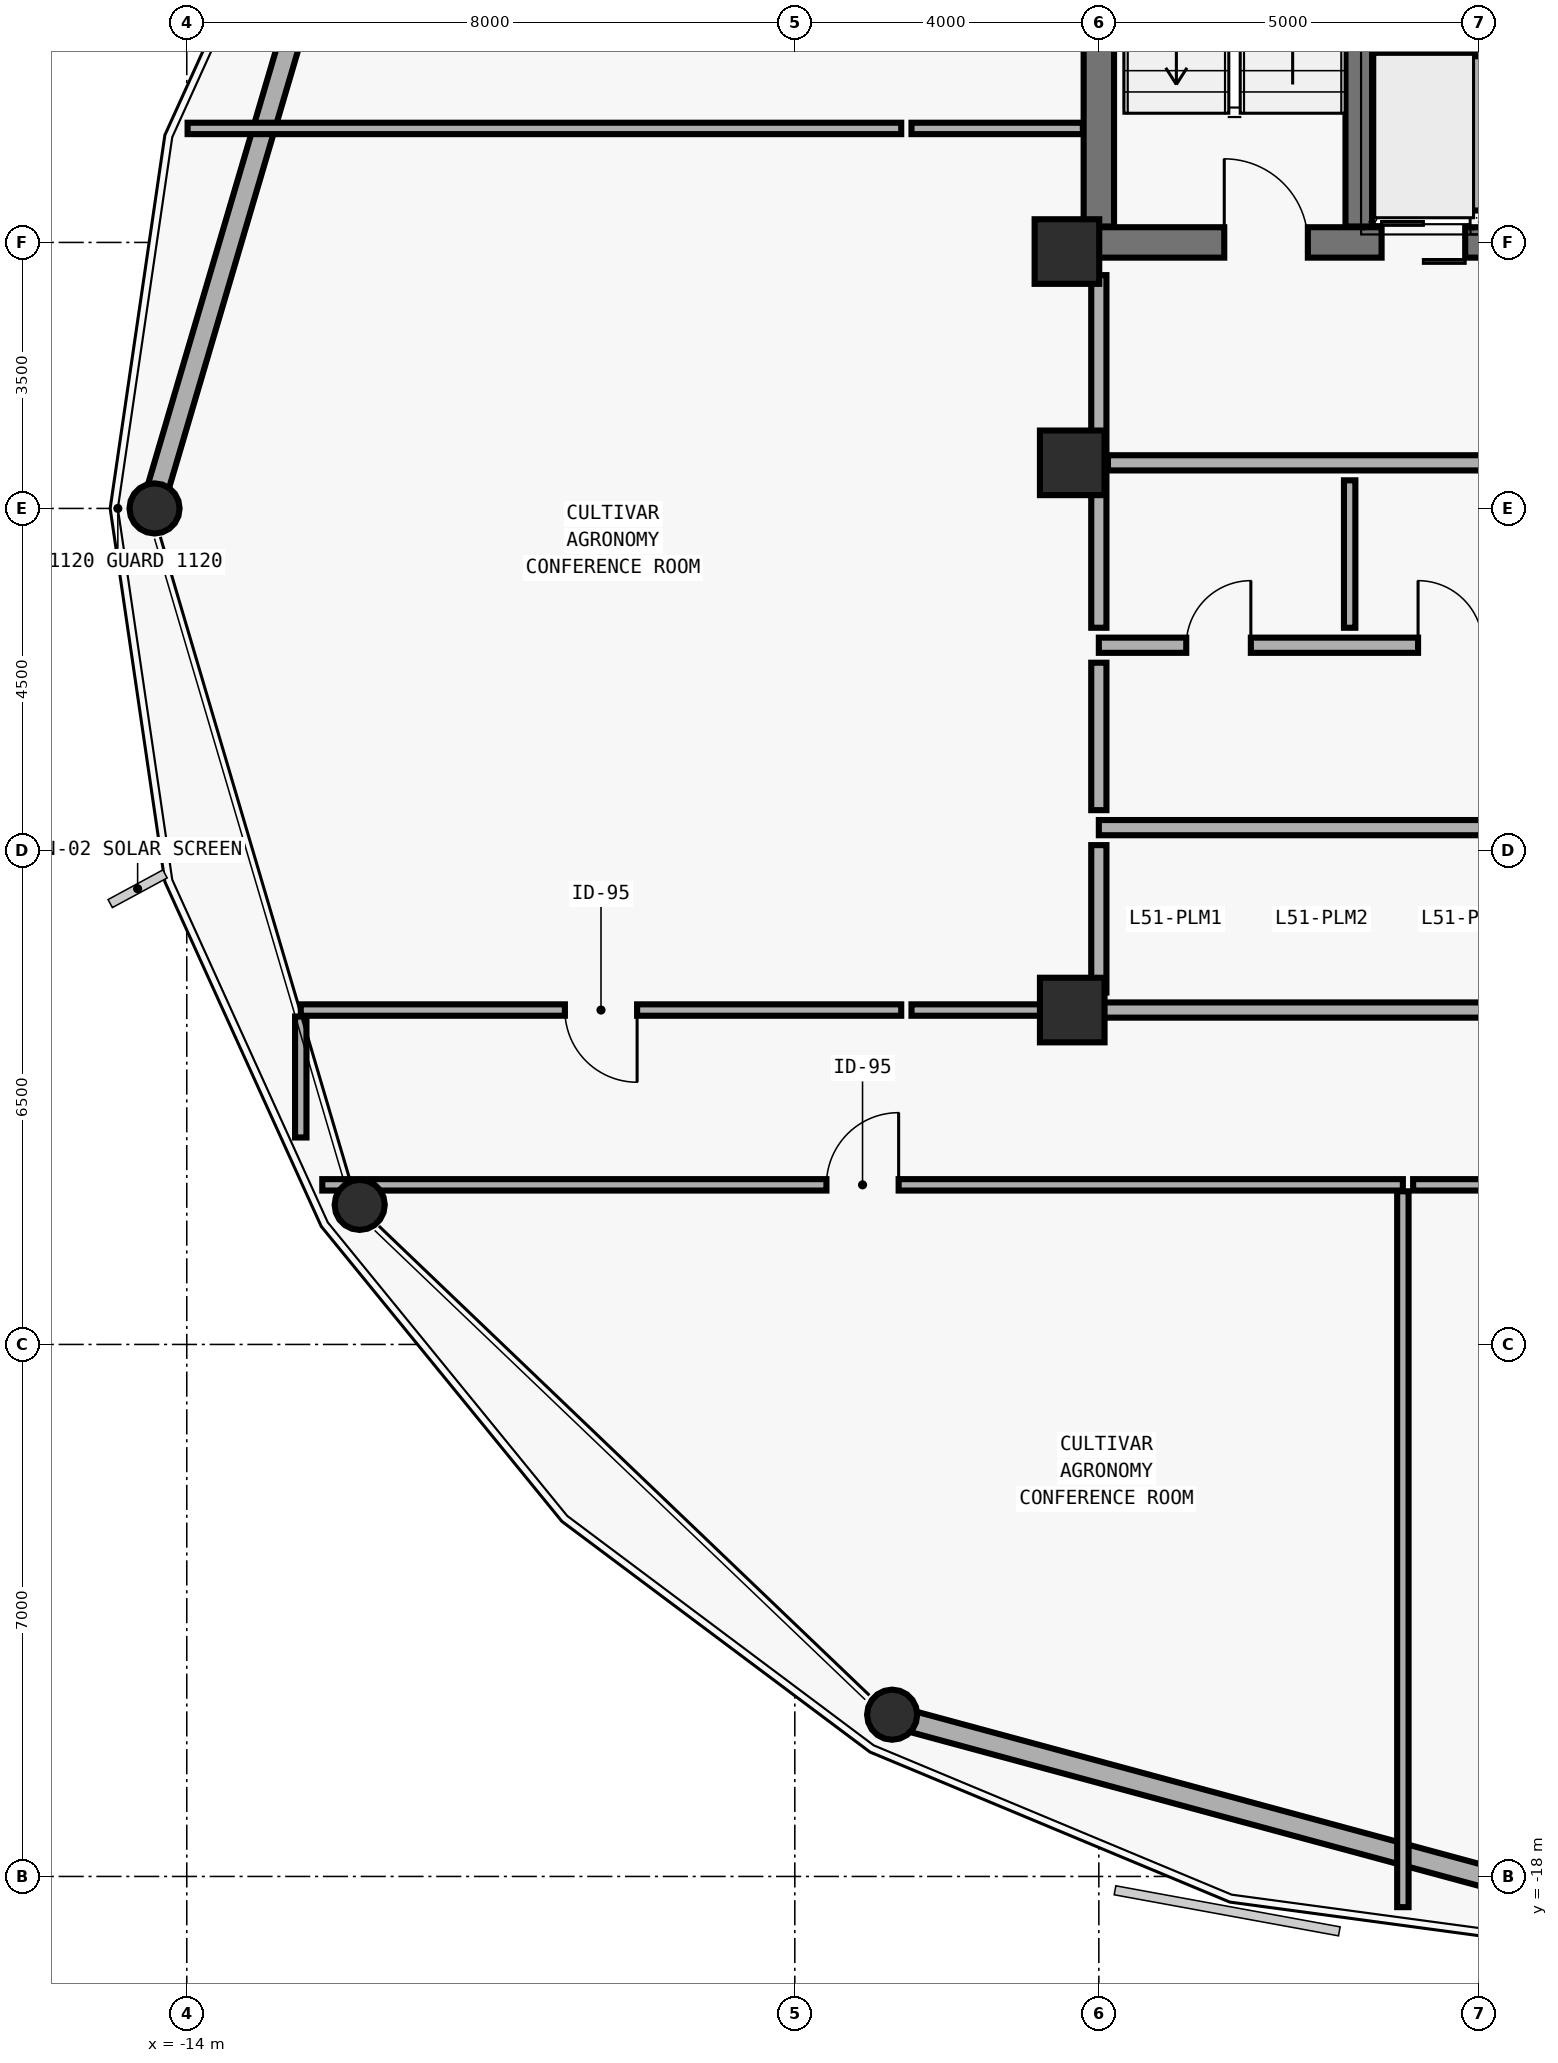
"""IFC4 building model, lengths in metres.
Left out: names, types, materials, properties, quantities, classifications, styles, units other than length and angle.
Written with IfcOpenShell. Run it as: python <this file> out.ifc"""

import sys

from ifc_helpers import new_model, si_unit, direction, frame, frame_2d, origin, origin_2d, place, context, subcontext, project, spatial, rectangle, hollow_circle, extrude, element, fill, save


model = new_model("IFC4")
c1 = context("Model", 3, precision=1e-05, world=origin(), true_north=direction((0.0, 1.0)))
c2 = subcontext(c1, "Body", "Model", "MODEL_VIEW")
j1 = project(units=[si_unit("LENGTHUNIT", "METRE"), si_unit("PLANEANGLEUNIT", "RADIAN")], contexts=[c1])
p1 = place(None, origin())
s1 = spatial("IfcSite", under=j1, at=p1, CompositionType="ELEMENT")
p2 = place(p1, origin())
s2 = spatial("IfcBuilding", under=s1, at=p2, CompositionType="ELEMENT")
p3 = place(p2, frame((0.0, 0.0, 204.0)))
s3 = spatial("IfcBuildingStorey", under=s2, at=p3, CompositionType="ELEMENT", Elevation=204.0)
p4 = place(p3, frame((-2.0, 3.5, 0.0), z_axis=(0.0, 0.0, 1.0), x_axis=(1.0, 0.0, 0.0)))
e1 = element("IfcWall", 1, at=p4, inside=s3, PredefinedType="SHEAR", context=c2, shape_type="SweptSolid", body=[
    extrude(rectangle(XDim=10.0, YDim=0.4, at=frame_2d((5.0, 0.0))), origin(), (0.0, 0.0, 1.0), 3.592),
])
p5 = place(p4, frame((1.65, 0.0, 0.0)))
e2 = element("IfcOpeningElement", 2, at=p5, cuts=e1, PredefinedType="OPENING", context=c2, shape_type="SweptSolid", body=[
    extrude(rectangle(XDim=1.1, YDim=2.15, at=frame_2d((0.55, 1.075))), frame((0.0, 0.21, 0.0), z_axis=(0.0, -1.0, 0.0), x_axis=(1.0, 0.0, 0.0)), (0.0, 0.0, 1.0), 0.42),
])
p6 = place(p4, frame((7.65, 0.0, 0.0)))
e3 = element("IfcOpeningElement", 3, at=p6, cuts=e1, PredefinedType="OPENING", context=c2, shape_type="SweptSolid", body=[
    extrude(rectangle(XDim=1.1, YDim=2.15, at=frame_2d((0.55, 1.075))), frame((0.0, 0.21, 0.0), z_axis=(0.0, -1.0, 0.0), x_axis=(1.0, 0.0, 0.0)), (0.0, 0.0, 1.0), 0.42),
])
p7 = place(p4, frame((3.72, 0.0, 0.0)))
e4 = element("IfcOpeningElement", 4, at=p7, cuts=e1, PredefinedType="OPENING", context=c2, shape_type="SweptSolid", body=[
    extrude(rectangle(XDim=1.1, YDim=2.2, at=frame_2d((0.55, 1.1))), frame((0.0, 0.21, 0.0), z_axis=(0.0, -1.0, 0.0), x_axis=(1.0, 0.0, 0.0)), (0.0, 0.0, 1.0), 0.42),
])
p8 = place(p4, frame((5.18, 0.0, 0.0)))
e5 = element("IfcOpeningElement", 5, at=p8, cuts=e1, PredefinedType="OPENING", context=c2, shape_type="SweptSolid", body=[
    extrude(rectangle(XDim=1.1, YDim=2.2, at=frame_2d((0.55, 1.1))), frame((0.0, 0.21, 0.0), z_axis=(0.0, -1.0, 0.0), x_axis=(1.0, 0.0, 0.0)), (0.0, 0.0, 1.0), 0.42),
])
p9 = place(p3, frame((-2.0, 3.71, 0.0), z_axis=(0.0, 0.0, 1.0), x_axis=(0.0, 1.0, 0.0)))
e6 = element("IfcWall", 6, at=p9, inside=s3, PredefinedType="SHEAR", context=c2, shape_type="SweptSolid", body=[
    extrude(rectangle(XDim=8.58, YDim=0.4, at=frame_2d((4.29, 0.0))), origin(), (0.0, 0.0, 1.0), 3.592),
])
p10 = place(p3, frame((1.42, 3.71, 0.0), z_axis=(0.0, 0.0, 1.0), x_axis=(0.0, 1.0, 0.0)))
e7 = element("IfcWall", 7, at=p10, inside=s3, PredefinedType="SHEAR", context=c2, shape_type="SweptSolid", body=[
    extrude(rectangle(XDim=8.58, YDim=0.35, at=frame_2d((4.29, 0.0))), origin(), (0.0, 0.0, 1.0), 3.592),
])
for number, where, z_axis, x_axis in (
    (8, (-2.42, 3.38, 0.0), (0.0, 0.0, 1.0), (1.0, 0.0, 0.0)),
    (9, (-2.35, 0.6, 0.0), (0.0, 0.0, 1.0), (1.0, 0.0, 0.0)),
    (10, (-2.35, -6.6, 0.0), (0.0, 0.0, 1.0), (1.0, 0.0, 0.0)),
):
    element("IfcColumn", number, at=place(p3, frame(where, z_axis=z_axis, x_axis=x_axis)), inside=s3, PredefinedType="COLUMN", context=c2, shape_type="SweptSolid", body=[
        extrude(rectangle(XDim=0.85, YDim=0.85, at=origin_2d()), origin(), (0.0, 0.0, 1.0), 3.575),
    ])
p11 = place(p3, frame((-14.458, 0.0, 0.0), z_axis=(0.019050015053, 0.0, 0.999818531998), x_axis=(0.0, 1.0, 0.0)))
e11 = element("IfcColumn", 11, at=p11, inside=s3, PredefinedType="COLUMN", context=c2, shape_type="SweptSolid", body=[
    extrude(hollow_circle(Radius=0.33, WallThickness=0.025, at=origin_2d()), origin(), (0.0, 0.0, 1.0), 3.576),
])
p12 = place(p3, frame((-11.754, -9.172, 0.0), z_axis=(0.016524222766, 0.004779733858, 0.999852041157), x_axis=(-0.277865302681, 0.960620046411, 0.0)))
e12 = element("IfcColumn", 12, at=p12, inside=s3, PredefinedType="COLUMN", context=c2, shape_type="SweptSolid", body=[
    extrude(hollow_circle(Radius=0.33, WallThickness=0.025, at=origin_2d()), origin(), (0.0, 0.0, 1.0), 3.575),
])
p13 = place(p3, frame((-4.737, -15.886, 0.0), z_axis=(0.009560119021, 0.008262674296, 0.999920162982), x_axis=(-0.653901224294, 0.756579928935, 0.0)))
e13 = element("IfcColumn", 13, at=p13, inside=s3, PredefinedType="COLUMN", context=c2, shape_type="SweptSolid", body=[
    extrude(hollow_circle(Radius=0.33, WallThickness=0.025, at=origin_2d()), origin(), (0.0, 0.0, 1.0), 3.575),
])
p14 = place(p3, frame((-14.377, 0.273, 0.0), z_axis=(0.0, 0.0, 1.0), x_axis=(0.282743953162, 0.959195421669, 0.0)))
e14 = element("IfcWall", 14, at=p14, inside=s3, PredefinedType="SOLIDWALL", context=c2, shape_type="SweptSolid", body=[
    extrude(rectangle(XDim=8.992, YDim=0.28, at=frame_2d((4.496, 0.0))), origin(), (0.0, 0.0, 1.0), 2.93),
])
p15 = place(p3, frame((4.575, -18.405, 0.0), z_axis=(0.0, 0.0, 1.0), x_axis=(-0.965320770618, 0.261066676948, 0.0)))
e15 = element("IfcWall", 15, at=p15, inside=s3, PredefinedType="SOLIDWALL", context=c2, shape_type="SweptSolid", body=[
    extrude(rectangle(XDim=9.361, YDim=0.28, at=frame_2d((4.681, 0.0))), origin(), (0.0, 0.0, 1.0), 2.93),
])
p16 = place(p3, frame((3.0, 3.92, 0.0), z_axis=(0.0, 0.0, 1.0), x_axis=(0.0, 1.0, 0.0)))
e16 = element("IfcWall", 16, at=p16, inside=s3, PredefinedType="SOLIDWALL", context=c2, shape_type="SweptSolid", body=[
    extrude(rectangle(XDim=2.03, YDim=0.2, at=frame_2d((1.015, 0.0))), origin(), (0.0, 0.0, 1.0), 3.36),
])
p17 = place(p3, frame((-2.0, -4.2, 0.0), z_axis=(0.0, 0.0, 1.0), x_axis=(1.0, 0.0, 0.0)))
e17 = element("IfcWall", 17, at=p17, inside=s3, PredefinedType="SOLIDWALL", context=c2, shape_type="SweptSolid", body=[
    extrude(rectangle(XDim=6.0, YDim=0.2, at=frame_2d((3.0, 0.0))), origin(), (0.0, 0.0, 1.0), 3.36),
])
p18 = place(p3, frame((-2.0, -6.6, 0.0), z_axis=(0.0, 0.0, 1.0), x_axis=(1.0, 0.0, 0.0)))
e18 = element("IfcWall", 18, at=p18, inside=s3, PredefinedType="SOLIDWALL", context=c2, shape_type="SweptSolid", body=[
    extrude(rectangle(XDim=6.0, YDim=0.2, at=frame_2d((3.0, 0.0))), origin(), (0.0, 0.0, 1.0), 3.012),
])
p19 = place(p3, frame((-2.0, -6.37, 0.0), z_axis=(0.0, 0.0, 1.0), x_axis=(0.0, 1.0, 0.0)))
e19 = element("IfcWall", 19, at=p19, inside=s3, PredefinedType="SOLIDWALL", context=c2, shape_type="SweptSolid", body=[
    extrude(rectangle(XDim=1.94, YDim=0.2, at=frame_2d((0.97, 0.0))), origin(), (0.0, 0.0, 1.0), 3.012),
])
p20 = place(p3, frame((-2.0, -1.8, 0.0), z_axis=(0.0, 0.0, 1.0), x_axis=(1.0, 0.0, 0.0)))
e20 = element("IfcWall", 20, at=p20, inside=s3, PredefinedType="MOVABLE", context=c2, shape_type="SweptSolid", body=[
    extrude(rectangle(XDim=5.84, YDim=0.2, at=frame_2d((2.92, 0.0))), origin(), (0.0, 0.0, 1.0), 3.36),
])
p21 = place(p20, frame((1.15, 0.0, 0.0)))
e21 = element("IfcOpeningElement", 21, at=p21, cuts=e20, PredefinedType="OPENING", context=c2, shape_type="SweptSolid", body=[
    extrude(rectangle(XDim=0.85, YDim=2.1, at=frame_2d((0.425, 1.05))), frame((0.0, 0.11, 0.0), z_axis=(0.0, -1.0, 0.0), x_axis=(1.0, 0.0, 0.0)), (0.0, 0.0, 1.0), 0.22),
])
p22 = place(p20, frame((4.2, 0.0, 0.0)))
e22 = element("IfcOpeningElement", 22, at=p22, cuts=e20, PredefinedType="OPENING", context=c2, shape_type="SweptSolid", body=[
    extrude(rectangle(XDim=0.85, YDim=2.1, at=frame_2d((0.425, 1.05))), frame((0.0, 0.11, 0.0), z_axis=(0.0, -1.0, 0.0), x_axis=(1.0, 0.0, 0.0)), (0.0, 0.0, 1.0), 0.22),
])
p23 = place(p3, frame((-12.217, -8.9, 0.0), z_axis=(0.0, 0.0, 1.0), x_axis=(1.0, 0.0, 0.0)))
e23 = element("IfcWall", 23, at=p23, inside=s3, PredefinedType="PARTITIONING", context=c2, shape_type="SweptSolid", body=[
    extrude(rectangle(XDim=14.217, YDim=0.15, at=frame_2d((7.108, 0.0))), origin(), (0.0, 0.0, 1.0), 2.842),
])
p24 = place(p23, frame((6.633, 0.0, 0.0)))
e24 = element("IfcOpeningElement", 24, at=p24, cuts=e23, PredefinedType="OPENING", context=c2, shape_type="SweptSolid", body=[
    extrude(rectangle(XDim=0.95, YDim=2.1, at=frame_2d((0.475, 1.05))), frame((0.0, 0.085, 0.0), z_axis=(0.0, -1.0, 0.0), x_axis=(1.0, 0.0, 0.0)), (0.0, 0.0, 1.0), 0.17),
])
p25 = place(p3, frame((-4.6, -6.6, 0.0), z_axis=(0.0, 0.0, 1.0), x_axis=(-1.0, 0.0, 0.0)))
e25 = element("IfcWall", 25, at=p25, inside=s3, PredefinedType="PARTITIONING", context=c2, shape_type="SweptSolid", body=[
    extrude(rectangle(XDim=7.9, YDim=0.15, at=frame_2d((3.95, 0.0))), origin(), (0.0, 0.0, 1.0), 2.842),
])
p26 = place(p25, frame((3.475, 0.0, 0.0)))
e26 = element("IfcOpeningElement", 26, at=p26, cuts=e25, PredefinedType="OPENING", context=c2, shape_type="SweptSolid", body=[
    extrude(rectangle(XDim=0.95, YDim=2.1, at=frame_2d((0.475, 1.05))), frame((0.0, 0.085, 0.0), z_axis=(0.0, -1.0, 0.0), x_axis=(1.0, 0.0, 0.0)), (0.0, 0.0, 1.0), 0.17),
])
p27 = place(p3, frame((-1.88, 0.6, 0.0), z_axis=(0.0, 0.0, 1.0), x_axis=(1.0, 0.0, 0.0)))
e27 = element("IfcWall", 27, at=p27, inside=s3, PredefinedType="MOVABLE", context=c2, shape_type="SweptSolid", body=[
    extrude(rectangle(XDim=5.72, YDim=0.2, at=frame_2d((2.86, 0.0))), origin(), (0.0, 0.0, 1.0), 3.012),
])
p28 = place(p3, frame((-2.0, 0.72, 0.0), z_axis=(0.0, 0.0, 1.0), x_axis=(0.0, 1.0, 0.0)))
e28 = element("IfcWall", 28, at=p28, inside=s3, PredefinedType="MOVABLE", context=c2, shape_type="SweptSolid", body=[
    extrude(rectangle(XDim=2.35, YDim=0.2, at=frame_2d((1.175, 0.0))), origin(), (0.0, 0.0, 1.0), 2.692),
])
p29 = place(p3, frame((-2.0, -3.97, 0.0), z_axis=(0.0, 0.0, 1.0), x_axis=(0.0, 1.0, 0.0)))
e29 = element("IfcWall", 29, at=p29, inside=s3, PredefinedType="MOVABLE", context=c2, shape_type="SweptSolid", body=[
    extrude(rectangle(XDim=1.94, YDim=0.2, at=frame_2d((0.97, 0.0))), origin(), (0.0, 0.0, 1.0), 3.012),
])
p30 = place(p3, frame((1.3, -1.57, 0.0), z_axis=(0.0, 0.0, 1.0), x_axis=(0.0, 1.0, 0.0)))
e30 = element("IfcWall", 30, at=p30, inside=s3, PredefinedType="PARTITIONING", context=c2, shape_type="SweptSolid", body=[
    extrude(rectangle(XDim=1.94, YDim=0.15, at=frame_2d((0.97, 0.0))), origin(), (0.0, 0.0, 1.0), 3.36),
])
p31 = place(p3, frame((-2.0, -1.57, 0.0), z_axis=(0.0, 0.0, 1.0), x_axis=(0.0, 1.0, 0.0)))
e31 = element("IfcWall", 31, at=p31, inside=s3, PredefinedType="MOVABLE", context=c2, shape_type="SweptSolid", body=[
    extrude(rectangle(XDim=2.05, YDim=0.2, at=frame_2d((1.025, 0.0))), origin(), (0.0, 0.0, 1.0), 3.012),
])
p32 = place(p3, frame((2.0, -8.985, 0.0), z_axis=(0.0, 0.0, 1.0), x_axis=(0.0, -1.0, 0.0)))
e32 = element("IfcWall", 32, at=p32, inside=s3, PredefinedType="PARTITIONING", context=c2, shape_type="SweptSolid", body=[
    extrude(rectangle(XDim=9.419, YDim=0.15, at=frame_2d((4.709, 0.0))), origin(), (0.0, 0.0, 1.0), 3.36),
])
p33 = place(p3, frame((2.135, -8.9, 0.0), z_axis=(0.0, 0.0, 1.0), x_axis=(1.0, 0.0, 0.0)))
e33 = element("IfcWall", 33, at=p33, inside=s3, PredefinedType="PARTITIONING", context=c2, shape_type="SweptSolid", body=[
    extrude(rectangle(XDim=5.78, YDim=0.15, at=frame_2d((2.89, 0.0))), origin(), (0.0, 0.0, 1.0), 3.36),
])
p34 = place(p3, frame((-2.16, -6.6, 0.0), z_axis=(0.0, 0.0, 1.0), x_axis=(-1.0, 0.0, 0.0)))
e34 = element("IfcWall", 34, at=p34, inside=s3, PredefinedType="PARTITIONING", context=c2, shape_type="SweptSolid", body=[
    extrude(rectangle(XDim=2.305, YDim=0.15, at=frame_2d((1.153, 0.0))), origin(), (0.0, 0.0, 1.0), 2.842),
])
p35 = place(p3, frame((-12.5, -6.685, 0.0), z_axis=(0.0, 0.0, 1.0), x_axis=(0.0, -1.0, 0.0)))
e35 = element("IfcWall", 35, at=p35, inside=s3, PredefinedType="PARTITIONING", context=c2, shape_type="SweptSolid", body=[
    extrude(rectangle(XDim=1.592, YDim=0.15, at=frame_2d((0.796, 0.0))), origin(), (0.0, 0.0, 1.0), 2.942),
])
p36 = place(p3, frame((-13.989, 5.0, 0.0), z_axis=(0.0, 0.0, 1.0), x_axis=(1.0, 0.0, 0.0)))
e36 = element("IfcWall", 36, at=p36, inside=s3, PredefinedType="PARTITIONING", context=c2, shape_type="SweptSolid", body=[
    extrude(rectangle(XDim=9.389, YDim=0.15, at=frame_2d((4.694, 0.0))), origin(), (0.0, 0.0, 1.0), 3.36),
])
p37 = place(p3, frame((-4.465, 5.0, 0.0), z_axis=(0.0, 0.0, 1.0), x_axis=(1.0, 0.0, 0.0)))
e37 = element("IfcWall", 37, at=p37, inside=s3, PredefinedType="PARTITIONING", context=c2, shape_type="SweptSolid", body=[
    extrude(rectangle(XDim=2.255, YDim=0.15, at=frame_2d((1.127, 0.0))), origin(), (0.0, 0.0, 1.0), 3.36),
])
p38 = place(p5, origin())
e38 = element("IfcDoor", 38, at=p38, inside=s3, OperationType="SINGLE_SWING_LEFT", PredefinedType="DOOR", context=c2, shape_type="SweptSolid", body=[
    extrude(rectangle(XDim=1.1, YDim=2.15, at=frame_2d((0.55, 1.075))), frame((0.0, 0.025, 0.0), z_axis=(0.0, -1.0, 0.0), x_axis=(1.0, 0.0, 0.0)), (0.0, 0.0, 1.0), 0.05),
])
fill(e2, e38)
p39 = place(p7, origin())
e39 = element("IfcDoor", 39, at=p39, inside=s3, OperationType="DOUBLE_DOOR_SLIDING", PredefinedType="DOOR", context=c2, shape_type="SweptSolid", body=[
    extrude(rectangle(XDim=1.1, YDim=2.2, at=frame_2d((0.55, 1.1))), frame((0.0, 0.025, 0.0), z_axis=(0.0, -1.0, 0.0), x_axis=(1.0, 0.0, 0.0)), (0.0, 0.0, 1.0), 0.05),
])
fill(e4, e39)
p40 = place(p21, origin())
e40 = element("IfcDoor", 40, at=p40, inside=s3, OperationType="SINGLE_SWING_RIGHT", PredefinedType="DOOR", context=c2, shape_type="SweptSolid", body=[
    extrude(rectangle(XDim=0.85, YDim=2.1, at=frame_2d((0.425, 1.05))), frame((0.0, 0.025, 0.0), z_axis=(0.0, -1.0, 0.0), x_axis=(1.0, 0.0, 0.0)), (0.0, 0.0, 1.0), 0.05),
])
fill(e21, e40)
p41 = place(p22, origin())
e41 = element("IfcDoor", 41, at=p41, inside=s3, OperationType="SINGLE_SWING_LEFT", PredefinedType="DOOR", context=c2, shape_type="SweptSolid", body=[
    extrude(rectangle(XDim=0.85, YDim=2.1, at=frame_2d((0.425, 1.05))), frame((0.0, 0.025, 0.0), z_axis=(0.0, -1.0, 0.0), x_axis=(1.0, 0.0, 0.0)), (0.0, 0.0, 1.0), 0.05),
])
fill(e22, e41)
p42 = place(p24, origin())
e42 = element("IfcDoor", 42, at=p42, inside=s3, OperationType="SINGLE_SWING_RIGHT", PredefinedType="DOOR", context=c2, shape_type="SweptSolid", body=[
    extrude(rectangle(XDim=0.95, YDim=2.1, at=frame_2d((0.475, 1.05))), frame((0.0, 0.025, 0.0), z_axis=(0.0, -1.0, 0.0), x_axis=(1.0, 0.0, 0.0)), (0.0, 0.0, 1.0), 0.05),
])
fill(e24, e42)
p43 = place(p26, origin())
e43 = element("IfcDoor", 43, at=p43, inside=s3, OperationType="SINGLE_SWING_LEFT", PredefinedType="DOOR", context=c2, shape_type="SweptSolid", body=[
    extrude(rectangle(XDim=0.95, YDim=2.1, at=frame_2d((0.475, 1.05))), frame((0.0, 0.025, 0.0), z_axis=(0.0, -1.0, 0.0), x_axis=(1.0, 0.0, 0.0)), (0.0, 0.0, 1.0), 0.05),
])
fill(e26, e43)
save(model, sys.argv[1])
